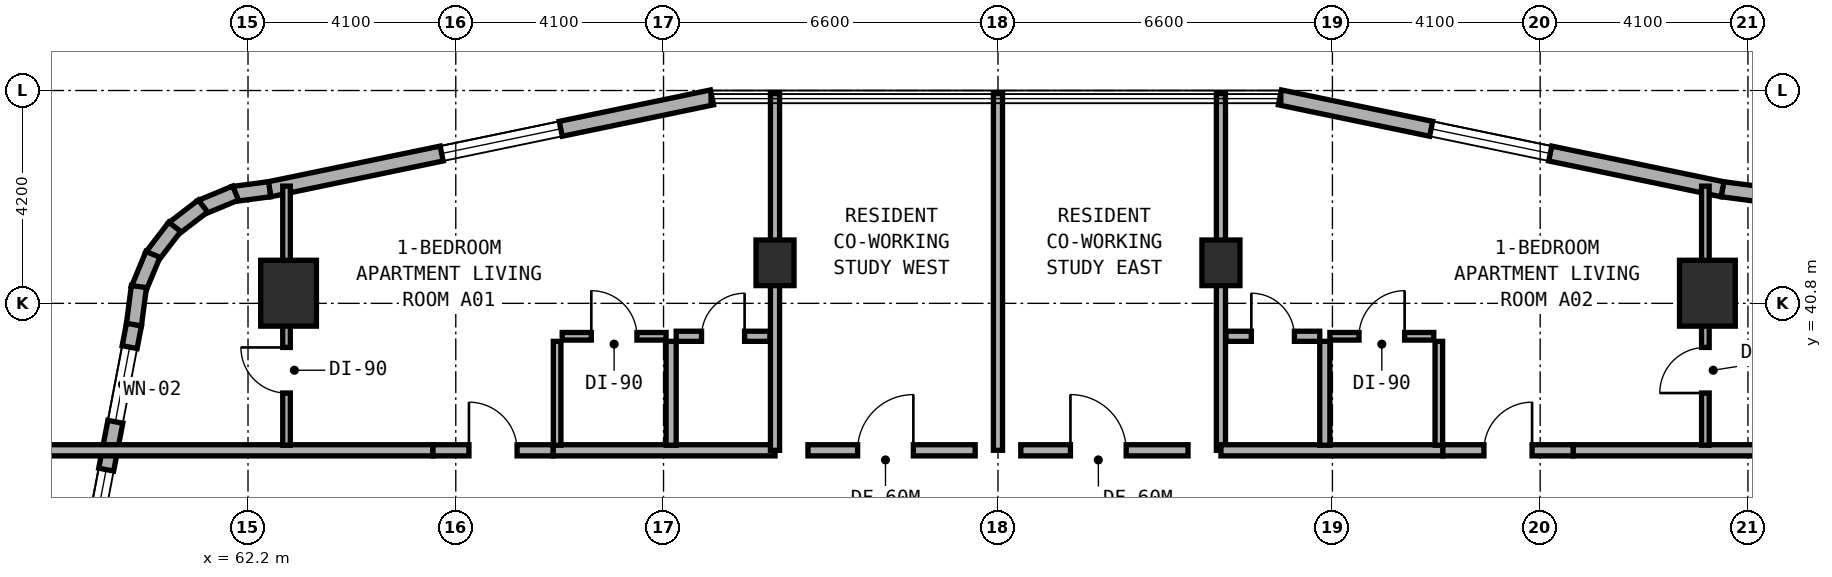
"""IFC4 building model, lengths in metres.
Left out: names, types, materials, properties, quantities, classifications, styles, units other than length and angle.
Written with IfcOpenShell. Run it as: python <this file> out.ifc"""

import sys

from ifc_helpers import new_model, si_unit, direction, frame, frame_2d, origin, origin_2d, place, context, subcontext, project, spatial, rectangle, extrude, element, fill, save


model = new_model("IFC4")
c1 = context("Model", 3, precision=1e-05, world=origin(), true_north=direction((0.0, 1.0)))
c2 = subcontext(c1, "Body", "Model", "MODEL_VIEW")
j1 = project(units=[si_unit("LENGTHUNIT", "METRE"), si_unit("PLANEANGLEUNIT", "RADIAN")], contexts=[c1])
p1 = place(None, origin())
s1 = spatial("IfcSite", under=j1, at=p1, CompositionType="ELEMENT")
p2 = place(p1, origin())
s2 = spatial("IfcBuilding", under=s1, at=p2, CompositionType="ELEMENT")
p3 = place(p2, frame((0.0, 0.0, 52.0)))
s3 = spatial("IfcBuildingStorey", under=s2, at=p3, CompositionType="ELEMENT", Elevation=52.0)
for number, where, z_axis, x_axis in (
    (1, (72.6, 41.6, 0.0), (0.0, 0.0, 1.0), (1.0, 0.0, 0.0)),
    (2, (81.4, 41.6, 0.0), (0.0, 0.0, 1.0), (1.0, 0.0, 0.0)),
):
    element("IfcColumn", number, at=place(p3, frame(where, z_axis=z_axis, x_axis=x_axis)), inside=s3, PredefinedType="COLUMN", context=c2, shape_type="SweptSolid", body=[
        extrude(rectangle(XDim=0.75, YDim=0.9, at=origin_2d()), origin(), (0.0, 0.0, 1.0), 3.5),
    ])
for number, where, z_axis, x_axis in (
    (3, (91.0, 41.0, 0.0), (0.0, 0.0, 1.0), (1.0, 0.0, 0.0)),
    (4, (63.0, 41.0, 0.0), (0.0, 0.0, 1.0), (1.0, 0.0, 0.0)),
):
    element("IfcColumn", number, at=place(p3, frame(where, z_axis=z_axis, x_axis=x_axis)), inside=s3, PredefinedType="COLUMN", context=c2, shape_type="SweptSolid", body=[
        extrude(rectangle(XDim=1.1, YDim=1.3, at=origin_2d()), origin(), (0.0, 0.0, 1.0), 3.5),
    ])
p4 = place(p3, frame((92.051, 42.953, 0.0), z_axis=(0.0, 0.0, 1.0), x_axis=(-0.991559404866, 0.129653178221, 0.0)))
e5 = element("IfcWall", 5, at=p4, inside=s3, PredefinedType="STANDARD", context=c2, shape_type="SweptSolid", body=[
    extrude(rectangle(XDim=0.764, YDim=0.3, at=frame_2d((0.382, 0.0))), origin(), (0.0, 0.0, 1.0), 3.25),
])
p5 = place(p3, frame((91.298, 43.051, 0.0), z_axis=(0.0, 0.0, 1.0), x_axis=(-0.979128391325, 0.203242695569, 0.0)))
e6 = element("IfcWall", 6, at=p5, inside=s3, PredefinedType="STANDARD", context=c2, shape_type="SweptSolid", body=[
    extrude(rectangle(XDim=8.92, YDim=0.3, at=frame_2d((4.46, 0.0))), origin(), (0.0, 0.0, 1.0), 3.25),
])
p6 = place(p5, frame((3.472, 0.0, 0.8)))
e7 = element("IfcOpeningElement", 7, at=p6, cuts=e6, PredefinedType="OPENING", context=c2, shape_type="SweptSolid", body=[
    extrude(rectangle(XDim=2.4, YDim=1.6, at=frame_2d((1.2, 0.8))), frame((0.0, 0.16, 0.0), z_axis=(0.0, -1.0, 0.0), x_axis=(1.0, 0.0, 0.0)), (0.0, 0.0, 1.0), 0.32),
])
p7 = place(p3, frame((71.356, 44.864, 0.0), z_axis=(0.0, 0.0, 1.0), x_axis=(-0.979127260729, -0.203248142175, 0.0)))
e8 = element("IfcWall", 8, at=p7, inside=s3, PredefinedType="STANDARD", context=c2, shape_type="SweptSolid", body=[
    extrude(rectangle(XDim=8.92, YDim=0.3, at=frame_2d((4.46, 0.0))), origin(), (0.0, 0.0, 1.0), 3.25),
])
p8 = place(p7, frame((3.048, 0.0, 0.8)))
e9 = element("IfcOpeningElement", 9, at=p8, cuts=e8, PredefinedType="OPENING", context=c2, shape_type="SweptSolid", body=[
    extrude(rectangle(XDim=2.4, YDim=1.6, at=frame_2d((1.2, 0.8))), frame((0.0, 0.16, 0.0), z_axis=(0.0, -1.0, 0.0), x_axis=(1.0, 0.0, 0.0)), (0.0, 0.0, 1.0), 0.32),
])
p9 = place(p3, frame((62.627, 43.052, 0.0), z_axis=(0.0, 0.0, 1.0), x_axis=(-0.991480488834, -0.130255288807, 0.0)))
e10 = element("IfcWall", 10, at=p9, inside=s3, PredefinedType="STANDARD", context=c2, shape_type="SweptSolid", body=[
    extrude(rectangle(XDim=0.729, YDim=0.3, at=frame_2d((0.365, 0.0))), origin(), (0.0, 0.0, 1.0), 3.25),
])
for number, where, z_axis, x_axis in (
    (11, (61.955, 42.976, 0.0), (0.0, 0.0, 1.0), (-0.924, -0.384, 0.0)),
    (12, (61.311, 42.721, 0.0), (0.0, 0.0, 1.0), (-0.794, -0.608, 0.0)),
    (13, (60.754, 42.309, 0.0), (0.0, 0.0, 1.0), (-0.608, -0.794, 0.0)),
    (14, (60.324, 41.766, 0.0), (0.0, 0.0, 1.0), (-0.383, -0.924, 0.0)),
):
    element("IfcWall", number, at=place(p3, frame(where, z_axis=z_axis, x_axis=x_axis)), inside=s3, PredefinedType="STANDARD", context=c2, shape_type="SweptSolid", body=[
        extrude(rectangle(XDim=0.746, YDim=0.3, at=frame_2d((0.373, 0.0))), origin(), (0.0, 0.0, 1.0), 3.25),
    ])
p10 = place(p3, frame((60.047, 41.131, 0.0), z_axis=(0.0, 0.0, 1.0), x_axis=(-0.129653178221, -0.991559404866, 0.0)))
e15 = element("IfcWall", 15, at=p10, inside=s3, PredefinedType="STANDARD", context=c2, shape_type="SweptSolid", body=[
    extrude(rectangle(XDim=0.764, YDim=0.3, at=frame_2d((0.382, 0.0))), origin(), (0.0, 0.0, 1.0), 3.25),
])
p11 = place(p3, frame((59.949, 40.38, 0.0), z_axis=(0.0, 0.0, 1.0), x_axis=(-0.188087874316, -0.982152203854, 0.0)))
e16 = element("IfcWall", 16, at=p11, inside=s3, PredefinedType="STANDARD", context=c2, shape_type="SweptSolid", body=[
    extrude(rectangle(XDim=9.634, YDim=0.3, at=frame_2d((4.817, 0.0))), origin(), (0.0, 0.0, 1.0), 3.25),
])
p12 = place(p11, frame((0.452, 0.0, 0.85)))
e17 = element("IfcOpeningElement", 17, at=p12, cuts=e16, PredefinedType="OPENING", context=c2, shape_type="SweptSolid", body=[
    extrude(rectangle(XDim=1.5, YDim=1.5, at=frame_2d((0.75, 0.75))), frame((0.0, 0.16, 0.0), z_axis=(0.0, -1.0, 0.0), x_axis=(1.0, 0.0, 0.0)), (0.0, 0.0, 1.0), 0.32),
])
p13 = place(p11, frame((2.913, 0.0, 0.85)))
e18 = element("IfcOpeningElement", 18, at=p13, cuts=e16, PredefinedType="OPENING", context=c2, shape_type="SweptSolid", body=[
    extrude(rectangle(XDim=1.2, YDim=1.5, at=frame_2d((0.6, 0.75))), frame((0.0, 0.16, 0.0), z_axis=(0.0, -1.0, 0.0), x_axis=(1.0, 0.0, 0.0)), (0.0, 0.0, 1.0), 0.32),
])
p14 = place(p11, frame((5.928, 0.0, 0.8)))
e19 = element("IfcOpeningElement", 19, at=p14, cuts=e16, PredefinedType="OPENING", context=c2, shape_type="SweptSolid", body=[
    extrude(rectangle(XDim=2.4, YDim=1.6, at=frame_2d((1.2, 0.8))), frame((0.0, 0.16, 0.0), z_axis=(0.0, -1.0, 0.0), x_axis=(1.0, 0.0, 0.0)), (0.0, 0.0, 1.0), 0.32),
])
p15 = place(p3, frame((58.16, 37.9, 0.0), z_axis=(0.0, 0.0, 1.0), x_axis=(1.0, 0.0, 0.0)))
e20 = element("IfcWall", 20, at=p15, inside=s3, PredefinedType="SOLIDWALL", context=c2, shape_type="SweptSolid", body=[
    extrude(rectangle(XDim=7.69, YDim=0.22, at=frame_2d((3.845, 0.0))), origin(), (0.0, 0.0, 1.0), 2.865),
])
p16 = place(p3, frame((68.22, 37.9, 0.0), z_axis=(0.0, 0.0, 1.0), x_axis=(1.0, 0.0, 0.0)))
e21 = element("IfcWall", 21, at=p16, inside=s3, PredefinedType="SOLIDWALL", context=c2, shape_type="SweptSolid", body=[
    extrude(rectangle(XDim=4.38, YDim=0.22, at=frame_2d((2.19, 0.0))), origin(), (0.0, 0.0, 1.0), 2.725),
])
p17 = place(p3, frame((65.85, 37.9, 0.0), z_axis=(0.0, 0.0, 1.0), x_axis=(1.0, 0.0, 0.0)))
e22 = element("IfcWall", 22, at=p17, inside=s3, PredefinedType="SOLIDWALL", context=c2, shape_type="SweptSolid", body=[
    extrude(rectangle(XDim=2.37, YDim=0.22, at=frame_2d((1.185, 0.0))), origin(), (0.0, 0.0, 1.0), 3.22),
])
p18 = place(p17, frame((0.71, 0.0, 0.0)))
e23 = element("IfcOpeningElement", 23, at=p18, cuts=e22, PredefinedType="OPENING", context=c2, shape_type="SweptSolid", body=[
    extrude(rectangle(XDim=0.95, YDim=2.1, at=frame_2d((0.475, 1.05))), frame((0.0, 0.12, 0.0), z_axis=(0.0, -1.0, 0.0), x_axis=(1.0, 0.0, 0.0)), (0.0, 0.0, 1.0), 0.24),
])
p19 = place(p3, frame((62.96, 38.0, 0.0), z_axis=(0.0, 0.0, 1.0), x_axis=(0.0, 1.0, 0.0)))
e24 = element("IfcWall", 24, at=p19, inside=s3, PredefinedType="PARTITIONING", context=c2, shape_type="SweptSolid", body=[
    extrude(rectangle(XDim=5.113, YDim=0.15, at=frame_2d((2.557, 0.0))), origin(), (0.0, 0.0, 1.0), 2.865),
])
p20 = place(p19, frame((1.03, 0.0, 0.0)))
e25 = element("IfcOpeningElement", 25, at=p20, cuts=e24, PredefinedType="OPENING", context=c2, shape_type="SweptSolid", body=[
    extrude(rectangle(XDim=0.9, YDim=2.1, at=frame_2d((0.45, 1.05))), frame((0.0, 0.085, 0.0), z_axis=(0.0, -1.0, 0.0), x_axis=(1.0, 0.0, 0.0)), (0.0, 0.0, 1.0), 0.17),
])
p21 = place(p3, frame((70.55, 38.0, 0.0), z_axis=(0.0, 0.0, 1.0), x_axis=(0.0, 1.0, 0.0)))
e26 = element("IfcWall", 26, at=p21, inside=s3, PredefinedType="PLUMBINGWALL", context=c2, shape_type="SweptSolid", body=[
    extrude(rectangle(XDim=2.05, YDim=0.2, at=frame_2d((1.025, 0.0))), origin(), (0.0, 0.0, 1.0), 3.22),
])
p22 = place(p3, frame((68.3, 38.0, 0.0), z_axis=(0.0, 0.0, 1.0), x_axis=(0.0, 1.0, 0.0)))
e27 = element("IfcWall", 27, at=p22, inside=s3, PredefinedType="PARTITIONING", context=c2, shape_type="SweptSolid", body=[
    extrude(rectangle(XDim=2.05, YDim=0.15, at=frame_2d((1.025, 0.0))), origin(), (0.0, 0.0, 1.0), 3.22),
])
p23 = place(p3, frame((70.65, 40.15, 0.0), z_axis=(0.0, 0.0, 1.0), x_axis=(1.0, 0.0, 0.0)))
e28 = element("IfcWall", 28, at=p23, inside=s3, PredefinedType="PLUMBINGWALL", context=c2, shape_type="SweptSolid", body=[
    extrude(rectangle(XDim=1.85, YDim=0.2, at=frame_2d((0.925, 0.0))), origin(), (0.0, 0.0, 1.0), 3.22),
])
p24 = place(p23, frame((0.5, 0.0, 0.0)))
e29 = element("IfcOpeningElement", 29, at=p24, cuts=e28, PredefinedType="OPENING", context=c2, shape_type="SweptSolid", body=[
    extrude(rectangle(XDim=0.85, YDim=2.1, at=frame_2d((0.425, 1.05))), frame((0.0, 0.11, 0.0), z_axis=(0.0, -1.0, 0.0), x_axis=(1.0, 0.0, 0.0)), (0.0, 0.0, 1.0), 0.22),
])
p25 = place(p3, frame((68.4, 40.15, 0.0), z_axis=(0.0, 0.0, 1.0), x_axis=(1.0, 0.0, 0.0)))
e30 = element("IfcWall", 30, at=p25, inside=s3, PredefinedType="PARTITIONING", context=c2, shape_type="SweptSolid", body=[
    extrude(rectangle(XDim=2.05, YDim=0.15, at=frame_2d((1.025, 0.0))), origin(), (0.0, 0.0, 1.0), 3.22),
])
p26 = place(p25, frame((0.575, 0.0, 0.0)))
e31 = element("IfcOpeningElement", 31, at=p26, cuts=e30, PredefinedType="OPENING", context=c2, shape_type="SweptSolid", body=[
    extrude(rectangle(XDim=0.9, YDim=2.1, at=frame_2d((0.45, 1.05))), frame((0.0, 0.085, 0.0), z_axis=(0.0, -1.0, 0.0), x_axis=(1.0, 0.0, 0.0)), (0.0, 0.0, 1.0), 0.17),
])
p27 = place(p3, frame((72.6, 37.9, 0.0), z_axis=(0.0, 0.0, 1.0), x_axis=(0.0, 1.0, 0.0)))
e32 = element("IfcWall", 32, at=p27, inside=s3, PredefinedType="SOLIDWALL", context=c2, shape_type="SweptSolid", body=[
    extrude(rectangle(XDim=7.04, YDim=0.18, at=frame_2d((3.52, 0.0))), origin(), (0.0, 0.0, 1.0), 2.725),
])
p28 = place(p3, frame((77.0, 37.9, 0.0), z_axis=(0.0, 0.0, 1.0), x_axis=(0.0, 1.0, 0.0)))
e33 = element("IfcWall", 33, at=p28, inside=s3, PredefinedType="SOLIDWALL", context=c2, shape_type="SweptSolid", body=[
    extrude(rectangle(XDim=7.04, YDim=0.18, at=frame_2d((3.52, 0.0))), origin(), (0.0, 0.0, 1.0), 2.775),
])
p29 = place(p3, frame((73.25, 37.9, 0.0), z_axis=(0.0, 0.0, 1.0), x_axis=(1.0, 0.0, 0.0)))
e34 = element("IfcWall", 34, at=p29, inside=s3, PredefinedType="SOLIDWALL", context=c2, shape_type="SweptSolid", body=[
    extrude(rectangle(XDim=3.3, YDim=0.22, at=frame_2d((1.65, 0.0))), origin(), (0.0, 0.0, 1.0), 3.22),
])
p30 = place(p29, frame((0.98, 0.0, 0.0)))
e35 = element("IfcOpeningElement", 35, at=p30, cuts=e34, PredefinedType="OPENING", context=c2, shape_type="SweptSolid", body=[
    extrude(rectangle(XDim=1.1, YDim=2.1, at=frame_2d((0.55, 1.05))), frame((0.0, 0.12, 0.0), z_axis=(0.0, -1.0, 0.0), x_axis=(1.0, 0.0, 0.0)), (0.0, 0.0, 1.0), 0.24),
])
p31 = place(p3, frame((77.45, 37.9, 0.0), z_axis=(0.0, 0.0, 1.0), x_axis=(1.0, 0.0, 0.0)))
e36 = element("IfcWall", 36, at=p31, inside=s3, PredefinedType="SOLIDWALL", context=c2, shape_type="SweptSolid", body=[
    extrude(rectangle(XDim=3.3, YDim=0.22, at=frame_2d((1.65, 0.0))), origin(), (0.0, 0.0, 1.0), 3.22),
])
p32 = place(p31, frame((0.98, 0.0, 0.0)))
e37 = element("IfcOpeningElement", 37, at=p32, cuts=e36, PredefinedType="OPENING", context=c2, shape_type="SweptSolid", body=[
    extrude(rectangle(XDim=1.1, YDim=2.1, at=frame_2d((0.55, 1.05))), frame((0.0, 0.12, 0.0), z_axis=(0.0, -1.0, 0.0), x_axis=(1.0, 0.0, 0.0)), (0.0, 0.0, 1.0), 0.24),
])
p33 = place(p3, frame((81.4, 37.9, 0.0), z_axis=(0.0, 0.0, 1.0), x_axis=(0.0, 1.0, 0.0)))
e38 = element("IfcWall", 38, at=p33, inside=s3, PredefinedType="SOLIDWALL", context=c2, shape_type="SweptSolid", body=[
    extrude(rectangle(XDim=7.04, YDim=0.18, at=frame_2d((3.52, 0.0))), origin(), (0.0, 0.0, 1.0), 2.725),
])
p34 = place(p3, frame((81.4, 37.9, 0.0), z_axis=(0.0, 0.0, 1.0), x_axis=(1.0, 0.0, 0.0)))
e39 = element("IfcWall", 39, at=p34, inside=s3, PredefinedType="SOLIDWALL", context=c2, shape_type="SweptSolid", body=[
    extrude(rectangle(XDim=4.38, YDim=0.22, at=frame_2d((2.19, 0.0))), origin(), (0.0, 0.0, 1.0), 2.725),
])
p35 = place(p3, frame((88.35, 37.9, 0.0), z_axis=(0.0, 0.0, 1.0), x_axis=(1.0, 0.0, 0.0)))
e40 = element("IfcWall", 40, at=p35, inside=s3, PredefinedType="SOLIDWALL", context=c2, shape_type="SweptSolid", body=[
    extrude(rectangle(XDim=7.41, YDim=0.22, at=frame_2d((3.705, 0.0))), origin(), (0.0, 0.0, 1.0), 2.865),
])
p36 = place(p3, frame((85.78, 37.9, 0.0), z_axis=(0.0, 0.0, 1.0), x_axis=(1.0, 0.0, 0.0)))
e41 = element("IfcWall", 41, at=p36, inside=s3, PredefinedType="SOLIDWALL", context=c2, shape_type="SweptSolid", body=[
    extrude(rectangle(XDim=2.57, YDim=0.22, at=frame_2d((1.285, 0.0))), origin(), (0.0, 0.0, 1.0), 3.22),
])
p37 = place(p36, frame((0.81, 0.0, 0.0)))
e42 = element("IfcOpeningElement", 42, at=p37, cuts=e41, PredefinedType="OPENING", context=c2, shape_type="SweptSolid", body=[
    extrude(rectangle(XDim=0.95, YDim=2.1, at=frame_2d((0.475, 1.05))), frame((0.0, 0.12, 0.0), z_axis=(0.0, -1.0, 0.0), x_axis=(1.0, 0.0, 0.0)), (0.0, 0.0, 1.0), 0.24),
])
p38 = place(p3, frame((90.96, 38.0, 0.0), z_axis=(0.0, 0.0, 1.0), x_axis=(0.0, 1.0, 0.0)))
e43 = element("IfcWall", 43, at=p38, inside=s3, PredefinedType="PARTITIONING", context=c2, shape_type="SweptSolid", body=[
    extrude(rectangle(XDim=5.113, YDim=0.15, at=frame_2d((2.557, 0.0))), origin(), (0.0, 0.0, 1.0), 2.865),
])
p39 = place(p38, frame((1.03, 0.0, 0.0)))
e44 = element("IfcOpeningElement", 44, at=p39, cuts=e43, PredefinedType="OPENING", context=c2, shape_type="SweptSolid", body=[
    extrude(rectangle(XDim=0.9, YDim=2.1, at=frame_2d((0.45, 1.05))), frame((0.0, 0.085, 0.0), z_axis=(0.0, -1.0, 0.0), x_axis=(1.0, 0.0, 0.0)), (0.0, 0.0, 1.0), 0.17),
])
p40 = place(p3, frame((83.45, 38.0, 0.0), z_axis=(0.0, 0.0, 1.0), x_axis=(0.0, 1.0, 0.0)))
e45 = element("IfcWall", 45, at=p40, inside=s3, PredefinedType="PLUMBINGWALL", context=c2, shape_type="SweptSolid", body=[
    extrude(rectangle(XDim=2.05, YDim=0.2, at=frame_2d((1.025, 0.0))), origin(), (0.0, 0.0, 1.0), 3.22),
])
p41 = place(p3, frame((85.7, 38.0, 0.0), z_axis=(0.0, 0.0, 1.0), x_axis=(0.0, 1.0, 0.0)))
e46 = element("IfcWall", 46, at=p41, inside=s3, PredefinedType="PARTITIONING", context=c2, shape_type="SweptSolid", body=[
    extrude(rectangle(XDim=2.05, YDim=0.15, at=frame_2d((1.025, 0.0))), origin(), (0.0, 0.0, 1.0), 3.22),
])
p42 = place(p3, frame((81.5, 40.15, 0.0), z_axis=(0.0, 0.0, 1.0), x_axis=(1.0, 0.0, 0.0)))
e47 = element("IfcWall", 47, at=p42, inside=s3, PredefinedType="PLUMBINGWALL", context=c2, shape_type="SweptSolid", body=[
    extrude(rectangle(XDim=1.85, YDim=0.2, at=frame_2d((0.925, 0.0))), origin(), (0.0, 0.0, 1.0), 2.725),
])
p43 = place(p42, frame((0.5, 0.0, 0.0)))
e48 = element("IfcOpeningElement", 48, at=p43, cuts=e47, PredefinedType="OPENING", context=c2, shape_type="SweptSolid", body=[
    extrude(rectangle(XDim=0.85, YDim=2.1, at=frame_2d((0.425, 1.05))), frame((0.0, 0.11, 0.0), z_axis=(0.0, -1.0, 0.0), x_axis=(1.0, 0.0, 0.0)), (0.0, 0.0, 1.0), 0.22),
])
p44 = place(p3, frame((83.55, 40.15, 0.0), z_axis=(0.0, 0.0, 1.0), x_axis=(1.0, 0.0, 0.0)))
e49 = element("IfcWall", 49, at=p44, inside=s3, PredefinedType="PARTITIONING", context=c2, shape_type="SweptSolid", body=[
    extrude(rectangle(XDim=2.05, YDim=0.15, at=frame_2d((1.025, 0.0))), origin(), (0.0, 0.0, 1.0), 3.22),
])
p45 = place(p44, frame((0.575, 0.0, 0.0)))
e50 = element("IfcOpeningElement", 50, at=p45, cuts=e49, PredefinedType="OPENING", context=c2, shape_type="SweptSolid", body=[
    extrude(rectangle(XDim=0.9, YDim=2.1, at=frame_2d((0.45, 1.05))), frame((0.0, 0.085, 0.0), z_axis=(0.0, -1.0, 0.0), x_axis=(1.0, 0.0, 0.0)), (0.0, 0.0, 1.0), 0.17),
])
p46 = place(p6, origin())
e51 = element("IfcWindow", 51, at=p46, inside=s3, PartitioningType="SINGLE_PANEL", PredefinedType="WINDOW", context=c2, shape_type="SweptSolid", body=[
    extrude(rectangle(XDim=2.4, YDim=1.6, at=frame_2d((1.2, 0.8))), frame((0.0, 0.03, 0.0), z_axis=(0.0, -1.0, 0.0), x_axis=(1.0, 0.0, 0.0)), (0.0, 0.0, 1.0), 0.06),
])
fill(e7, e51)
p47 = place(p8, origin())
e52 = element("IfcWindow", 52, at=p47, inside=s3, PartitioningType="SINGLE_PANEL", PredefinedType="WINDOW", context=c2, shape_type="SweptSolid", body=[
    extrude(rectangle(XDim=2.4, YDim=1.6, at=frame_2d((1.2, 0.8))), frame((0.0, 0.03, 0.0), z_axis=(0.0, -1.0, 0.0), x_axis=(1.0, 0.0, 0.0)), (0.0, 0.0, 1.0), 0.06),
])
fill(e9, e52)
p48 = place(p12, origin())
e53 = element("IfcWindow", 53, at=p48, inside=s3, PartitioningType="SINGLE_PANEL", PredefinedType="WINDOW", context=c2, shape_type="SweptSolid", body=[
    extrude(rectangle(XDim=1.5, YDim=1.5, at=frame_2d((0.75, 0.75))), frame((0.0, 0.03, 0.0), z_axis=(0.0, -1.0, 0.0), x_axis=(1.0, 0.0, 0.0)), (0.0, 0.0, 1.0), 0.06),
])
fill(e17, e53)
p49 = place(p13, origin())
e54 = element("IfcWindow", 54, at=p49, inside=s3, PartitioningType="SINGLE_PANEL", PredefinedType="WINDOW", context=c2, shape_type="SweptSolid", body=[
    extrude(rectangle(XDim=1.2, YDim=1.5, at=frame_2d((0.6, 0.75))), frame((0.0, 0.03, 0.0), z_axis=(0.0, -1.0, 0.0), x_axis=(1.0, 0.0, 0.0)), (0.0, 0.0, 1.0), 0.06),
])
fill(e18, e54)
p50 = place(p18, origin())
e55 = element("IfcDoor", 55, at=p50, inside=s3, OperationType="SINGLE_SWING_LEFT", PredefinedType="DOOR", context=c2, shape_type="SweptSolid", body=[
    extrude(rectangle(XDim=0.95, YDim=2.1, at=frame_2d((0.475, 1.05))), frame((0.0, 0.025, 0.0), z_axis=(0.0, -1.0, 0.0), x_axis=(1.0, 0.0, 0.0)), (0.0, 0.0, 1.0), 0.05),
])
fill(e23, e55)
p51 = place(p20, origin())
e56 = element("IfcDoor", 56, at=p51, inside=s3, OperationType="SINGLE_SWING_RIGHT", PredefinedType="DOOR", context=c2, shape_type="SweptSolid", body=[
    extrude(rectangle(XDim=0.9, YDim=2.1, at=frame_2d((0.45, 1.05))), frame((0.0, 0.025, 0.0), z_axis=(0.0, -1.0, 0.0), x_axis=(1.0, 0.0, 0.0)), (0.0, 0.0, 1.0), 0.05),
])
fill(e25, e56)
p52 = place(p24, origin())
e57 = element("IfcDoor", 57, at=p52, inside=s3, OperationType="SINGLE_SWING_RIGHT", PredefinedType="DOOR", context=c2, shape_type="SweptSolid", body=[
    extrude(rectangle(XDim=0.85, YDim=2.1, at=frame_2d((0.425, 1.05))), frame((0.0, 0.025, 0.0), z_axis=(0.0, -1.0, 0.0), x_axis=(1.0, 0.0, 0.0)), (0.0, 0.0, 1.0), 0.05),
])
fill(e29, e57)
p53 = place(p26, origin())
e58 = element("IfcDoor", 58, at=p53, inside=s3, OperationType="SINGLE_SWING_LEFT", PredefinedType="DOOR", context=c2, shape_type="SweptSolid", body=[
    extrude(rectangle(XDim=0.9, YDim=2.1, at=frame_2d((0.45, 1.05))), frame((0.0, 0.025, 0.0), z_axis=(0.0, -1.0, 0.0), x_axis=(1.0, 0.0, 0.0)), (0.0, 0.0, 1.0), 0.05),
])
fill(e31, e58)
p54 = place(p30, origin())
e59 = element("IfcDoor", 59, at=p54, inside=s3, OperationType="SINGLE_SWING_RIGHT", PredefinedType="DOOR", context=c2, shape_type="SweptSolid", body=[
    extrude(rectangle(XDim=1.1, YDim=2.1, at=frame_2d((0.55, 1.05))), frame((0.0, 0.025, 0.0), z_axis=(0.0, -1.0, 0.0), x_axis=(1.0, 0.0, 0.0)), (0.0, 0.0, 1.0), 0.05),
])
fill(e35, e59)
p55 = place(p32, origin())
e60 = element("IfcDoor", 60, at=p55, inside=s3, OperationType="SINGLE_SWING_LEFT", PredefinedType="DOOR", context=c2, shape_type="SweptSolid", body=[
    extrude(rectangle(XDim=1.1, YDim=2.1, at=frame_2d((0.55, 1.05))), frame((0.0, 0.025, 0.0), z_axis=(0.0, -1.0, 0.0), x_axis=(1.0, 0.0, 0.0)), (0.0, 0.0, 1.0), 0.05),
])
fill(e37, e60)
p56 = place(p37, origin())
e61 = element("IfcDoor", 61, at=p56, inside=s3, OperationType="SINGLE_SWING_RIGHT", PredefinedType="DOOR", context=c2, shape_type="SweptSolid", body=[
    extrude(rectangle(XDim=0.95, YDim=2.1, at=frame_2d((0.475, 1.05))), frame((0.0, 0.025, 0.0), z_axis=(0.0, -1.0, 0.0), x_axis=(1.0, 0.0, 0.0)), (0.0, 0.0, 1.0), 0.05),
])
fill(e42, e61)
p57 = place(p39, origin())
e62 = element("IfcDoor", 62, at=p57, inside=s3, OperationType="SINGLE_SWING_LEFT", PredefinedType="DOOR", context=c2, shape_type="SweptSolid", body=[
    extrude(rectangle(XDim=0.9, YDim=2.1, at=frame_2d((0.45, 1.05))), frame((0.0, 0.025, 0.0), z_axis=(0.0, -1.0, 0.0), x_axis=(1.0, 0.0, 0.0)), (0.0, 0.0, 1.0), 0.05),
])
fill(e44, e62)
p58 = place(p43, origin())
e63 = element("IfcDoor", 63, at=p58, inside=s3, OperationType="SINGLE_SWING_LEFT", PredefinedType="DOOR", context=c2, shape_type="SweptSolid", body=[
    extrude(rectangle(XDim=0.85, YDim=2.1, at=frame_2d((0.425, 1.05))), frame((0.0, 0.025, 0.0), z_axis=(0.0, -1.0, 0.0), x_axis=(1.0, 0.0, 0.0)), (0.0, 0.0, 1.0), 0.05),
])
fill(e48, e63)
p59 = place(p45, origin())
e64 = element("IfcDoor", 64, at=p59, inside=s3, OperationType="SINGLE_SWING_RIGHT", PredefinedType="DOOR", context=c2, shape_type="SweptSolid", body=[
    extrude(rectangle(XDim=0.9, YDim=2.1, at=frame_2d((0.45, 1.05))), frame((0.0, 0.025, 0.0), z_axis=(0.0, -1.0, 0.0), x_axis=(1.0, 0.0, 0.0)), (0.0, 0.0, 1.0), 0.05),
])
fill(e50, e64)
save(model, sys.argv[1])
